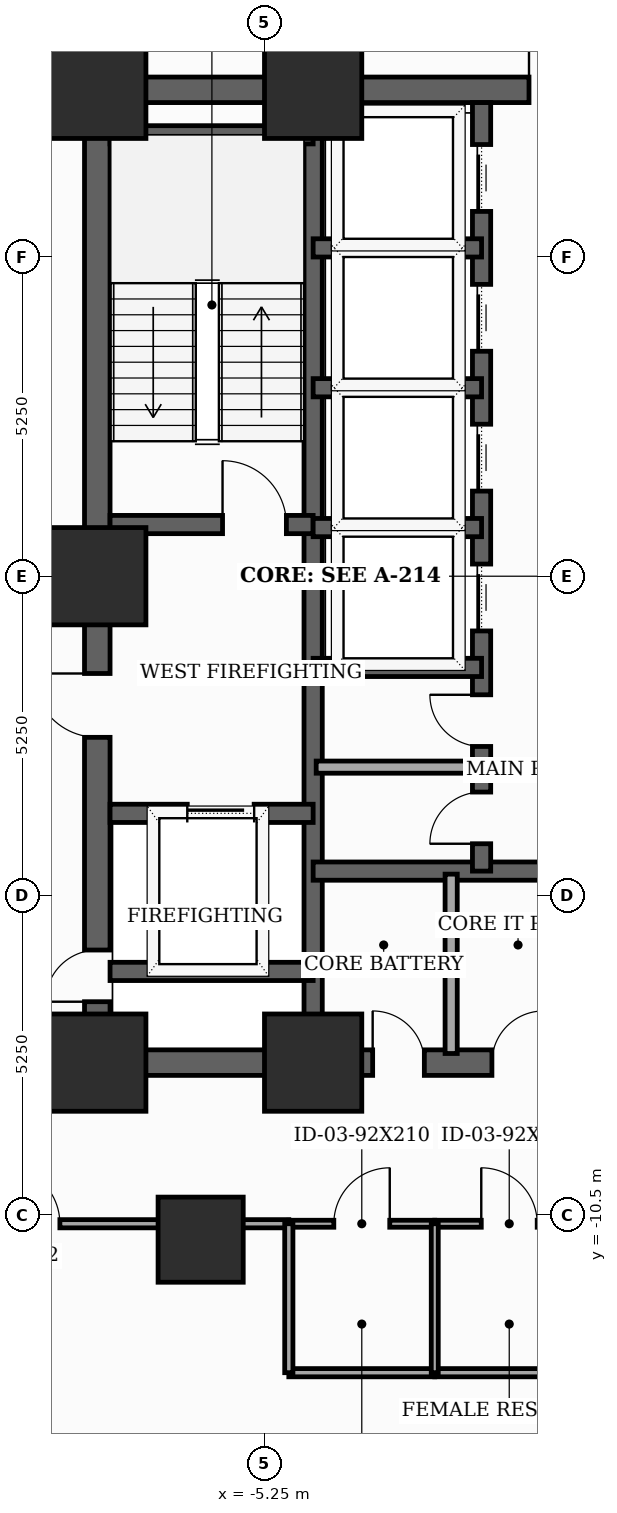
"""IFC4 building model, lengths in metres.
Left out: names, types, materials, properties, quantities, classifications, styles, units other than length and angle.
Written with IfcOpenShell. Run it as: python <this file> out.ifc"""

import sys

from ifc_helpers import new_model, si_unit, direction, frame, frame_2d, origin, origin_2d, place, context, subcontext, project, spatial, rectangle, extrude, element, fill, save


model = new_model("IFC4")
c1 = context("Model", 3, precision=1e-05, world=origin(), true_north=direction((0.0, 1.0)))
c2 = subcontext(c1, "Body", "Model", "MODEL_VIEW")
j1 = project(units=[si_unit("LENGTHUNIT", "METRE"), si_unit("PLANEANGLEUNIT", "RADIAN")], contexts=[c1])
p1 = place(None, origin())
s1 = spatial("IfcSite", under=j1, at=p1, CompositionType="ELEMENT")
p2 = place(p1, origin())
s2 = spatial("IfcBuilding", under=s1, at=p2, CompositionType="ELEMENT")
p3 = place(p2, frame((0.0, 0.0, 81.5)))
s3 = spatial("IfcBuildingStorey", under=s2, at=p3, CompositionType="ELEMENT", Elevation=81.5)
for number, where, z_axis, x_axis in (
    (1, (-8.0, -8.0, 0.0), (0.0, 0.0, 1.0), (1.0, 0.0, 0.0)),
    (2, (-4.45, -8.0, 0.0), (0.0, 0.0, 1.0), (1.0, 0.0, 0.0)),
    (3, (-4.45, 8.0, 0.0), (0.0, 0.0, 1.0), (1.0, 0.0, 0.0)),
    (4, (-8.0, 8.0, 0.0), (0.0, 0.0, 1.0), (1.0, 0.0, 0.0)),
    (5, (-8.0, 0.0, 0.0), (0.0, 0.0, 1.0), (1.0, 0.0, 0.0)),
):
    element("IfcColumn", number, at=place(p3, frame(where, z_axis=z_axis, x_axis=x_axis)), inside=s3, PredefinedType="COLUMN", context=c2, shape_type="SweptSolid", body=[
        extrude(rectangle(XDim=1.6, YDim=1.6, at=origin_2d()), origin(), (0.0, 0.0, 1.0), 3.7),
    ])
p4 = place(p3, frame((-6.3, -10.912, 0.0), z_axis=(0.0, 0.0, 1.0), x_axis=(1.0, 0.0, 0.0)))
e6 = element("IfcColumn", 6, at=p4, inside=s3, PredefinedType="COLUMN", context=c2, shape_type="SweptSolid", body=[
    extrude(rectangle(XDim=1.4, YDim=1.4, at=origin_2d()), origin(), (0.0, 0.0, 1.0), 3.7),
])
p5 = place(p3, frame((-8.0, -8.0, 0.0), z_axis=(0.0, 0.0, 1.0), x_axis=(0.0, 1.0, 0.0)))
e7 = element("IfcWall", 7, at=p5, inside=s3, PredefinedType="SHEAR", context=c2, shape_type="SweptSolid", body=[
    extrude(rectangle(XDim=16.0, YDim=0.42, at=frame_2d((8.0, 0.0))), origin(), (0.0, 0.0, 1.0), 3.46),
])
p6 = place(p5, frame((1.002, 0.0, 0.0)))
e8 = element("IfcOpeningElement", 8, at=p6, cuts=e7, PredefinedType="OPENING", context=c2, shape_type="SweptSolid", body=[
    extrude(rectangle(XDim=0.85, YDim=2.02, at=frame_2d((0.425, 1.01))), frame((0.0, 0.22, 0.0), z_axis=(0.0, -1.0, 0.0), x_axis=(1.0, 0.0, 0.0)), (0.0, 0.0, 1.0), 0.44),
])
p7 = place(p5, frame((5.35, 0.0, 0.0)))
e9 = element("IfcOpeningElement", 9, at=p7, cuts=e7, PredefinedType="OPENING", context=c2, shape_type="SweptSolid", body=[
    extrude(rectangle(XDim=1.05, YDim=2.15, at=frame_2d((0.525, 1.075))), frame((0.0, 0.22, 0.0), z_axis=(0.0, -1.0, 0.0), x_axis=(1.0, 0.0, 0.0)), (0.0, 0.0, 1.0), 0.44),
])
p8 = place(p3, frame((-8.0, -8.0, 0.0), z_axis=(0.0, 0.0, 1.0), x_axis=(1.0, 0.0, 0.0)))
e10 = element("IfcWall", 10, at=p8, inside=s3, PredefinedType="SHEAR", context=c2, shape_type="SweptSolid", body=[
    extrude(rectangle(XDim=16.0, YDim=0.42, at=frame_2d((8.0, 0.0))), origin(), (0.0, 0.0, 1.0), 3.46),
])
p9 = place(p8, frame((4.529, 0.0, 0.0)))
e11 = element("IfcOpeningElement", 11, at=p9, cuts=e10, PredefinedType="OPENING", context=c2, shape_type="SweptSolid", body=[
    extrude(rectangle(XDim=0.85, YDim=2.02, at=frame_2d((0.425, 1.01))), frame((0.0, 0.22, 0.0), z_axis=(0.0, -1.0, 0.0), x_axis=(1.0, 0.0, 0.0)), (0.0, 0.0, 1.0), 0.44),
])
p10 = place(p8, frame((6.49, 0.0, 0.0)))
e12 = element("IfcOpeningElement", 12, at=p10, cuts=e10, PredefinedType="OPENING", context=c2, shape_type="SweptSolid", body=[
    extrude(rectangle(XDim=0.85, YDim=2.02, at=frame_2d((0.425, 1.01))), frame((0.0, 0.22, 0.0), z_axis=(0.0, -1.0, 0.0), x_axis=(1.0, 0.0, 0.0)), (0.0, 0.0, 1.0), 0.44),
])
p11 = place(p8, frame((8.69, 0.0, 0.0)))
e13 = element("IfcOpeningElement", 13, at=p11, cuts=e10, PredefinedType="OPENING", context=c2, shape_type="SweptSolid", body=[
    extrude(rectangle(XDim=0.85, YDim=2.02, at=frame_2d((0.425, 1.01))), frame((0.0, 0.22, 0.0), z_axis=(0.0, -1.0, 0.0), x_axis=(1.0, 0.0, 0.0)), (0.0, 0.0, 1.0), 0.44),
])
p12 = place(p8, frame((10.621, 0.0, 0.0)))
e14 = element("IfcOpeningElement", 14, at=p12, cuts=e10, PredefinedType="OPENING", context=c2, shape_type="SweptSolid", body=[
    extrude(rectangle(XDim=0.85, YDim=2.02, at=frame_2d((0.425, 1.01))), frame((0.0, 0.22, 0.0), z_axis=(0.0, -1.0, 0.0), x_axis=(1.0, 0.0, 0.0)), (0.0, 0.0, 1.0), 0.44),
])
p13 = place(p3, frame((-8.0, 8.0, 0.0), z_axis=(0.0, 0.0, 1.0), x_axis=(1.0, 0.0, 0.0)))
e15 = element("IfcWall", 15, at=p13, inside=s3, PredefinedType="SHEAR", context=c2, shape_type="SweptSolid", body=[
    extrude(rectangle(XDim=16.0, YDim=0.42, at=frame_2d((8.0, 0.0))), origin(), (0.0, 0.0, 1.0), 3.46),
])
p14 = place(p13, frame((7.1, 0.0, 0.0)))
e16 = element("IfcOpeningElement", 16, at=p14, cuts=e15, PredefinedType="OPENING", context=c2, shape_type="SweptSolid", body=[
    extrude(rectangle(XDim=1.8, YDim=2.15, at=frame_2d((0.9, 1.075))), frame((0.0, 0.22, 0.0), z_axis=(0.0, -1.0, 0.0), x_axis=(1.0, 0.0, 0.0)), (0.0, 0.0, 1.0), 0.44),
])
p15 = place(p3, frame((-4.45, -7.79, 0.0), z_axis=(0.0, 0.0, 1.0), x_axis=(0.0, 1.0, 0.0)))
e17 = element("IfcWall", 17, at=p15, inside=s3, PredefinedType="SHEAR", context=c2, shape_type="SweptSolid", body=[
    extrude(rectangle(XDim=15.58, YDim=0.3, at=frame_2d((7.79, 0.0))), origin(), (0.0, 0.0, 1.0), 3.46),
])
p16 = place(p3, frame((-7.79, 0.85, 0.0), z_axis=(0.0, 0.0, 1.0), x_axis=(1.0, 0.0, 0.0)))
e18 = element("IfcWall", 18, at=p16, inside=s3, PredefinedType="SHEAR", context=c2, shape_type="SweptSolid", body=[
    extrude(rectangle(XDim=3.34, YDim=0.3, at=frame_2d((1.67, 0.0))), origin(), (0.0, 0.0, 1.0), 3.46),
])
p17 = place(p16, frame((1.85, 0.0, 0.0)))
e19 = element("IfcOpeningElement", 19, at=p17, cuts=e18, PredefinedType="OPENING", context=c2, shape_type="SweptSolid", body=[
    extrude(rectangle(XDim=1.05, YDim=2.15, at=frame_2d((0.525, 1.075))), frame((0.0, 0.16, 0.0), z_axis=(0.0, -1.0, 0.0), x_axis=(1.0, 0.0, 0.0)), (0.0, 0.0, 1.0), 0.32),
])
p18 = place(p3, frame((-7.79, 7.26, 0.0), z_axis=(0.0, 0.0, 1.0), x_axis=(1.0, 0.0, 0.0)))
e20 = element("IfcWall", 20, at=p18, inside=s3, PredefinedType="SHEAR", context=c2, shape_type="SweptSolid", body=[
    extrude(rectangle(XDim=3.34, YDim=0.3, at=frame_2d((1.67, 0.0))), origin(), (0.0, 0.0, 1.0), 3.46),
])
p19 = place(p3, frame((-7.79, -3.9, 0.0), z_axis=(0.0, 0.0, 1.0), x_axis=(1.0, 0.0, 0.0)))
e21 = element("IfcWall", 21, at=p19, inside=s3, PredefinedType="SHEAR", context=c2, shape_type="SweptSolid", body=[
    extrude(rectangle(XDim=3.34, YDim=0.3, at=frame_2d((1.67, 0.0))), origin(), (0.0, 0.0, 1.0), 3.46),
])
p20 = place(p19, frame((1.27, 0.0, 0.0)))
e22 = element("IfcOpeningElement", 22, at=p20, cuts=e21, PredefinedType="OPENING", context=c2, shape_type="SweptSolid", body=[
    extrude(rectangle(XDim=1.1, YDim=2.1, at=frame_2d((0.55, 1.05))), frame((0.0, 0.16, 0.0), z_axis=(0.0, -1.0, 0.0), x_axis=(1.0, 0.0, 0.0)), (0.0, 0.0, 1.0), 0.32),
])
p21 = place(p3, frame((-7.79, -6.5, 0.0), z_axis=(0.0, 0.0, 1.0), x_axis=(1.0, 0.0, 0.0)))
e23 = element("IfcWall", 23, at=p21, inside=s3, PredefinedType="SHEAR", context=c2, shape_type="SweptSolid", body=[
    extrude(rectangle(XDim=3.34, YDim=0.3, at=frame_2d((1.67, 0.0))), origin(), (0.0, 0.0, 1.0), 3.46),
])
p22 = place(p3, frame((-4.45, -4.85, 0.0), z_axis=(0.0, 0.0, 1.0), x_axis=(1.0, 0.0, 0.0)))
e24 = element("IfcWall", 24, at=p22, inside=s3, PredefinedType="SHEAR", context=c2, shape_type="SweptSolid", body=[
    extrude(rectangle(XDim=8.9, YDim=0.3, at=frame_2d((4.45, 0.0))), origin(), (0.0, 0.0, 1.0), 3.46),
])
p23 = place(p3, frame((-1.68, -4.85, 0.0), z_axis=(0.0, 0.0, 1.0), x_axis=(0.0, 1.0, 0.0)))
e25 = element("IfcWall", 25, at=p23, inside=s3, PredefinedType="SHEAR", context=c2, shape_type="SweptSolid", body=[
    extrude(rectangle(XDim=12.64, YDim=0.3, at=frame_2d((6.32, 0.0))), origin(), (0.0, 0.0, 1.0), 3.46),
])
p24 = place(p23, frame((3.95, 0.0, 0.0)))
e26 = element("IfcOpeningElement", 26, at=p24, cuts=e25, PredefinedType="OPENING", context=c2, shape_type="SweptSolid", body=[
    extrude(rectangle(XDim=1.1, YDim=2.1, at=frame_2d((0.55, 1.05))), frame((0.0, 0.16, 0.0), z_axis=(0.0, -1.0, 0.0), x_axis=(1.0, 0.0, 0.0)), (0.0, 0.0, 1.0), 0.32),
])
p25 = place(p23, frame((6.25, 0.0, 0.0)))
e27 = element("IfcOpeningElement", 27, at=p25, cuts=e25, PredefinedType="OPENING", context=c2, shape_type="SweptSolid", body=[
    extrude(rectangle(XDim=1.1, YDim=2.1, at=frame_2d((0.55, 1.05))), frame((0.0, 0.16, 0.0), z_axis=(0.0, -1.0, 0.0), x_axis=(1.0, 0.0, 0.0)), (0.0, 0.0, 1.0), 0.32),
])
p26 = place(p23, frame((8.55, 0.0, 0.0)))
e28 = element("IfcOpeningElement", 28, at=p26, cuts=e25, PredefinedType="OPENING", context=c2, shape_type="SweptSolid", body=[
    extrude(rectangle(XDim=1.1, YDim=2.1, at=frame_2d((0.55, 1.05))), frame((0.0, 0.16, 0.0), z_axis=(0.0, -1.0, 0.0), x_axis=(1.0, 0.0, 0.0)), (0.0, 0.0, 1.0), 0.32),
])
p27 = place(p23, frame((10.85, 0.0, 0.0)))
e29 = element("IfcOpeningElement", 29, at=p27, cuts=e25, PredefinedType="OPENING", context=c2, shape_type="SweptSolid", body=[
    extrude(rectangle(XDim=1.1, YDim=2.1, at=frame_2d((0.55, 1.05))), frame((0.0, 0.16, 0.0), z_axis=(0.0, -1.0, 0.0), x_axis=(1.0, 0.0, 0.0)), (0.0, 0.0, 1.0), 0.32),
])
p28 = place(p23, frame((0.45, 0.0, 0.0)))
e30 = element("IfcOpeningElement", 30, at=p28, cuts=e25, PredefinedType="OPENING", context=c2, shape_type="SweptSolid", body=[
    extrude(rectangle(XDim=0.85, YDim=2.02, at=frame_2d((0.425, 1.01))), frame((0.0, 0.16, 0.0), z_axis=(0.0, -1.0, 0.0), x_axis=(1.0, 0.0, 0.0)), (0.0, 0.0, 1.0), 0.32),
])
p29 = place(p23, frame((2.05, 0.0, 0.0)))
e31 = element("IfcOpeningElement", 31, at=p29, cuts=e25, PredefinedType="OPENING", context=c2, shape_type="SweptSolid", body=[
    extrude(rectangle(XDim=0.85, YDim=2.02, at=frame_2d((0.425, 1.01))), frame((0.0, 0.16, 0.0), z_axis=(0.0, -1.0, 0.0), x_axis=(1.0, 0.0, 0.0)), (0.0, 0.0, 1.0), 0.32),
])
for number, where, z_axis, x_axis in (
    (32, (-4.45, -1.5, 0.0), (0.0, 0.0, 1.0), (1.0, 0.0, 0.0)),
    (33, (-4.45, 0.8, 0.0), (0.0, 0.0, 1.0), (1.0, 0.0, 0.0)),
    (34, (-4.45, 3.1, 0.0), (0.0, 0.0, 1.0), (1.0, 0.0, 0.0)),
    (35, (-4.45, 5.4, 0.0), (0.0, 0.0, 1.0), (1.0, 0.0, 0.0)),
):
    element("IfcWall", number, at=place(p3, frame(where, z_axis=z_axis, x_axis=x_axis)), inside=s3, PredefinedType="SHEAR", context=c2, shape_type="SweptSolid", body=[
        extrude(rectangle(XDim=2.77, YDim=0.3, at=frame_2d((1.385, 0.0))), origin(), (0.0, 0.0, 1.0), 3.46),
    ])
p30 = place(p3, frame((-2.18, -7.85, 0.0), z_axis=(0.0, 0.0, 1.0), x_axis=(0.0, 1.0, 0.0)))
e36 = element("IfcWall", 36, at=p30, inside=s3, PredefinedType="SOLIDWALL", context=c2, shape_type="SweptSolid", body=[
    extrude(rectangle(XDim=2.95, YDim=0.2, at=frame_2d((1.475, 0.0))), origin(), (0.0, 0.0, 1.0), 2.845),
])
p31 = place(p3, frame((-4.4, -3.14, 0.0), z_axis=(0.0, 0.0, 1.0), x_axis=(1.0, 0.0, 0.0)))
e37 = element("IfcWall", 37, at=p31, inside=s3, PredefinedType="SOLIDWALL", context=c2, shape_type="SweptSolid", body=[
    extrude(rectangle(XDim=2.68, YDim=0.2, at=frame_2d((1.34, 0.0))), origin(), (0.0, 0.0, 1.0), 3.46),
])
p32 = place(p3, frame((-10.15, -10.65, 0.0), z_axis=(0.0, 0.0, 1.0), x_axis=(1.0, 0.0, 0.0)))
e38 = element("IfcWall", 38, at=p32, inside=s3, PredefinedType="PARTITIONING", context=c2, shape_type="SweptSolid", body=[
    extrude(rectangle(XDim=5.3, YDim=0.135, at=frame_2d((2.65, 0.0))), origin(), (0.0, 0.0, 1.0), 2.045),
])
p33 = place(p32, frame((0.585, 0.0, 0.0)))
e39 = element("IfcOpeningElement", 39, at=p33, cuts=e38, PredefinedType="OPENING", context=c2, shape_type="SweptSolid", body=[
    extrude(rectangle(XDim=0.95, YDim=2.0, at=frame_2d((0.475, 1.0))), frame((0.0, 0.077, 0.0), z_axis=(0.0, -1.0, 0.0), x_axis=(1.0, 0.0, 0.0)), (0.0, 0.0, 1.0), 0.155),
])
p34 = place(p3, frame((-4.85, -10.65, 0.0), z_axis=(0.0, 0.0, 1.0), x_axis=(1.0, 0.0, 0.0)))
e40 = element("IfcWall", 40, at=p34, inside=s3, PredefinedType="PARTITIONING", context=c2, shape_type="SweptSolid", body=[
    extrude(rectangle(XDim=2.4, YDim=0.115, at=frame_2d((1.2, 0.0))), origin(), (0.0, 0.0, 1.0), 3.46),
])
p35 = place(p34, frame((0.74, 0.0, 0.0)))
e41 = element("IfcOpeningElement", 41, at=p35, cuts=e40, PredefinedType="OPENING", context=c2, shape_type="SweptSolid", body=[
    extrude(rectangle(XDim=0.92, YDim=2.1, at=frame_2d((0.46, 1.05))), frame((0.0, 0.067, 0.0), z_axis=(0.0, -1.0, 0.0), x_axis=(1.0, 0.0, 0.0)), (0.0, 0.0, 1.0), 0.135),
])
p36 = place(p3, frame((-2.45, -10.65, 0.0), z_axis=(0.0, 0.0, 1.0), x_axis=(1.0, 0.0, 0.0)))
e42 = element("IfcWall", 42, at=p36, inside=s3, PredefinedType="PARTITIONING", context=c2, shape_type="SweptSolid", body=[
    extrude(rectangle(XDim=2.45, YDim=0.115, at=frame_2d((1.225, 0.0))), origin(), (0.0, 0.0, 1.0), 2.745),
])
p37 = place(p36, frame((0.765, 0.0, 0.0)))
e43 = element("IfcOpeningElement", 43, at=p37, cuts=e42, PredefinedType="OPENING", context=c2, shape_type="SweptSolid", body=[
    extrude(rectangle(XDim=0.92, YDim=2.1, at=frame_2d((0.46, 1.05))), frame((0.0, 0.067, 0.0), z_axis=(0.0, -1.0, 0.0), x_axis=(1.0, 0.0, 0.0)), (0.0, 0.0, 1.0), 0.135),
])
p38 = place(p3, frame((-2.45, -13.1, 0.0), z_axis=(0.0, 0.0, 1.0), x_axis=(-1.0, 0.0, 0.0)))
e44 = element("IfcWall", 44, at=p38, inside=s3, PredefinedType="PARTITIONING", context=c2, shape_type="SweptSolid", body=[
    extrude(rectangle(XDim=2.4, YDim=0.135, at=frame_2d((1.2, 0.0))), origin(), (0.0, 0.0, 1.0), 3.46),
])
p39 = place(p3, frame((-4.85, -13.1, 0.0), z_axis=(0.0, 0.0, 1.0), x_axis=(0.0, 1.0, 0.0)))
e45 = element("IfcWall", 45, at=p39, inside=s3, PredefinedType="PARTITIONING", context=c2, shape_type="SweptSolid", body=[
    extrude(rectangle(XDim=2.45, YDim=0.135, at=frame_2d((1.225, 0.0))), origin(), (0.0, 0.0, 1.0), 2.745),
])
p40 = place(p3, frame((0.0, -13.1, 0.0), z_axis=(0.0, 0.0, 1.0), x_axis=(-1.0, 0.0, 0.0)))
e46 = element("IfcWall", 46, at=p40, inside=s3, PredefinedType="PARTITIONING", context=c2, shape_type="SweptSolid", body=[
    extrude(rectangle(XDim=2.45, YDim=0.135, at=frame_2d((1.225, 0.0))), origin(), (0.0, 0.0, 1.0), 2.045),
])
p41 = place(p3, frame((-2.45, -13.1, 0.0), z_axis=(0.0, 0.0, 1.0), x_axis=(0.0, 1.0, 0.0)))
e47 = element("IfcWall", 47, at=p41, inside=s3, PredefinedType="PARTITIONING", context=c2, shape_type="SweptSolid", body=[
    extrude(rectangle(XDim=2.45, YDim=0.115, at=frame_2d((1.225, 0.0))), origin(), (0.0, 0.0, 1.0), 2.745),
])
p42 = place(p6, origin())
e48 = element("IfcDoor", 48, at=p42, inside=s3, OperationType="SINGLE_SWING_LEFT", PredefinedType="TRAPDOOR", context=c2, shape_type="SweptSolid", body=[
    extrude(rectangle(XDim=0.85, YDim=2.02, at=frame_2d((0.425, 1.01))), frame((0.0, 0.025, 0.0), z_axis=(0.0, -1.0, 0.0), x_axis=(1.0, 0.0, 0.0)), (0.0, 0.0, 1.0), 0.05),
])
fill(e8, e48)
p43 = place(p7, origin())
e49 = element("IfcDoor", 49, at=p43, inside=s3, OperationType="SINGLE_SWING_RIGHT", PredefinedType="DOOR", context=c2, shape_type="SweptSolid", body=[
    extrude(rectangle(XDim=1.05, YDim=2.15, at=frame_2d((0.525, 1.075))), frame((0.0, 0.025, 0.0), z_axis=(0.0, -1.0, 0.0), x_axis=(1.0, 0.0, 0.0)), (0.0, 0.0, 1.0), 0.05),
])
fill(e9, e49)
p44 = place(p9, origin())
e50 = element("IfcDoor", 50, at=p44, inside=s3, OperationType="SINGLE_SWING_LEFT", PredefinedType="TRAPDOOR", context=c2, shape_type="SweptSolid", body=[
    extrude(rectangle(XDim=0.85, YDim=2.02, at=frame_2d((0.425, 1.01))), frame((0.0, 0.025, 0.0), z_axis=(0.0, -1.0, 0.0), x_axis=(1.0, 0.0, 0.0)), (0.0, 0.0, 1.0), 0.05),
])
fill(e11, e50)
p45 = place(p10, origin())
e51 = element("IfcDoor", 51, at=p45, inside=s3, OperationType="SINGLE_SWING_RIGHT", PredefinedType="TRAPDOOR", context=c2, shape_type="SweptSolid", body=[
    extrude(rectangle(XDim=0.85, YDim=2.02, at=frame_2d((0.425, 1.01))), frame((0.0, 0.025, 0.0), z_axis=(0.0, -1.0, 0.0), x_axis=(1.0, 0.0, 0.0)), (0.0, 0.0, 1.0), 0.05),
])
fill(e12, e51)
p46 = place(p14, origin())
e52 = element("IfcDoor", 52, at=p46, inside=s3, OperationType="DOUBLE_DOOR_SINGLE_SWING", PredefinedType="DOOR", context=c2, shape_type="SweptSolid", body=[
    extrude(rectangle(XDim=1.8, YDim=2.15, at=frame_2d((0.9, 1.075))), frame((0.0, 0.025, 0.0), z_axis=(0.0, -1.0, 0.0), x_axis=(1.0, 0.0, 0.0)), (0.0, 0.0, 1.0), 0.05),
])
fill(e16, e52)
p47 = place(p17, origin())
e53 = element("IfcDoor", 53, at=p47, inside=s3, OperationType="SINGLE_SWING_LEFT", PredefinedType="DOOR", context=c2, shape_type="SweptSolid", body=[
    extrude(rectangle(XDim=1.05, YDim=2.15, at=frame_2d((0.525, 1.075))), frame((0.0, 0.025, 0.0), z_axis=(0.0, -1.0, 0.0), x_axis=(1.0, 0.0, 0.0)), (0.0, 0.0, 1.0), 0.05),
])
fill(e19, e53)
p48 = place(p20, origin())
e54 = element("IfcDoor", 54, at=p48, inside=s3, OperationType="SLIDING_TO_LEFT", PredefinedType="DOOR", context=c2, shape_type="SweptSolid", body=[
    extrude(rectangle(XDim=1.1, YDim=2.1, at=frame_2d((0.55, 1.05))), frame((0.0, 0.025, 0.0), z_axis=(0.0, -1.0, 0.0), x_axis=(1.0, 0.0, 0.0)), (0.0, 0.0, 1.0), 0.05),
])
fill(e22, e54)
p49 = place(p24, origin())
e55 = element("IfcDoor", 55, at=p49, inside=s3, OperationType="SLIDING_TO_LEFT", PredefinedType="DOOR", context=c2, shape_type="SweptSolid", body=[
    extrude(rectangle(XDim=1.1, YDim=2.1, at=frame_2d((0.55, 1.05))), frame((0.0, 0.025, 0.0), z_axis=(0.0, -1.0, 0.0), x_axis=(1.0, 0.0, 0.0)), (0.0, 0.0, 1.0), 0.05),
])
fill(e26, e55)
p50 = place(p25, origin())
e56 = element("IfcDoor", 56, at=p50, inside=s3, OperationType="SLIDING_TO_LEFT", PredefinedType="DOOR", context=c2, shape_type="SweptSolid", body=[
    extrude(rectangle(XDim=1.1, YDim=2.1, at=frame_2d((0.55, 1.05))), frame((0.0, 0.025, 0.0), z_axis=(0.0, -1.0, 0.0), x_axis=(1.0, 0.0, 0.0)), (0.0, 0.0, 1.0), 0.05),
])
fill(e27, e56)
p51 = place(p26, origin())
e57 = element("IfcDoor", 57, at=p51, inside=s3, OperationType="SLIDING_TO_LEFT", PredefinedType="DOOR", context=c2, shape_type="SweptSolid", body=[
    extrude(rectangle(XDim=1.1, YDim=2.1, at=frame_2d((0.55, 1.05))), frame((0.0, 0.025, 0.0), z_axis=(0.0, -1.0, 0.0), x_axis=(1.0, 0.0, 0.0)), (0.0, 0.0, 1.0), 0.05),
])
fill(e28, e57)
p52 = place(p27, origin())
e58 = element("IfcDoor", 58, at=p52, inside=s3, OperationType="SLIDING_TO_LEFT", PredefinedType="DOOR", context=c2, shape_type="SweptSolid", body=[
    extrude(rectangle(XDim=1.1, YDim=2.1, at=frame_2d((0.55, 1.05))), frame((0.0, 0.025, 0.0), z_axis=(0.0, -1.0, 0.0), x_axis=(1.0, 0.0, 0.0)), (0.0, 0.0, 1.0), 0.05),
])
fill(e29, e58)
p53 = place(p28, origin())
e59 = element("IfcDoor", 59, at=p53, inside=s3, OperationType="SINGLE_SWING_LEFT", PredefinedType="TRAPDOOR", context=c2, shape_type="SweptSolid", body=[
    extrude(rectangle(XDim=0.85, YDim=2.02, at=frame_2d((0.425, 1.01))), frame((0.0, 0.025, 0.0), z_axis=(0.0, -1.0, 0.0), x_axis=(1.0, 0.0, 0.0)), (0.0, 0.0, 1.0), 0.05),
])
fill(e30, e59)
p54 = place(p29, origin())
e60 = element("IfcDoor", 60, at=p54, inside=s3, OperationType="SINGLE_SWING_RIGHT", PredefinedType="TRAPDOOR", context=c2, shape_type="SweptSolid", body=[
    extrude(rectangle(XDim=0.85, YDim=2.02, at=frame_2d((0.425, 1.01))), frame((0.0, 0.025, 0.0), z_axis=(0.0, -1.0, 0.0), x_axis=(1.0, 0.0, 0.0)), (0.0, 0.0, 1.0), 0.05),
])
fill(e31, e60)
p55 = place(p33, origin())
e61 = element("IfcDoor", 61, at=p55, inside=s3, OperationType="SINGLE_SWING_LEFT", PredefinedType="DOOR", context=c2, shape_type="SweptSolid", body=[
    extrude(rectangle(XDim=0.95, YDim=2.0, at=frame_2d((0.475, 1.0))), frame((0.0, 0.025, 0.0), z_axis=(0.0, -1.0, 0.0), x_axis=(1.0, 0.0, 0.0)), (0.0, 0.0, 1.0), 0.05),
])
fill(e39, e61)
p56 = place(p35, origin())
e62 = element("IfcDoor", 62, at=p56, inside=s3, OperationType="SINGLE_SWING_RIGHT", PredefinedType="DOOR", context=c2, shape_type="SweptSolid", body=[
    extrude(rectangle(XDim=0.92, YDim=2.1, at=frame_2d((0.46, 1.05))), frame((0.0, 0.025, 0.0), z_axis=(0.0, -1.0, 0.0), x_axis=(1.0, 0.0, 0.0)), (0.0, 0.0, 1.0), 0.05),
])
fill(e41, e62)
p57 = place(p37, origin())
e63 = element("IfcDoor", 63, at=p57, inside=s3, OperationType="SINGLE_SWING_LEFT", PredefinedType="DOOR", context=c2, shape_type="SweptSolid", body=[
    extrude(rectangle(XDim=0.92, YDim=2.1, at=frame_2d((0.46, 1.05))), frame((0.0, 0.025, 0.0), z_axis=(0.0, -1.0, 0.0), x_axis=(1.0, 0.0, 0.0)), (0.0, 0.0, 1.0), 0.05),
])
fill(e43, e63)
save(model, sys.argv[1])
